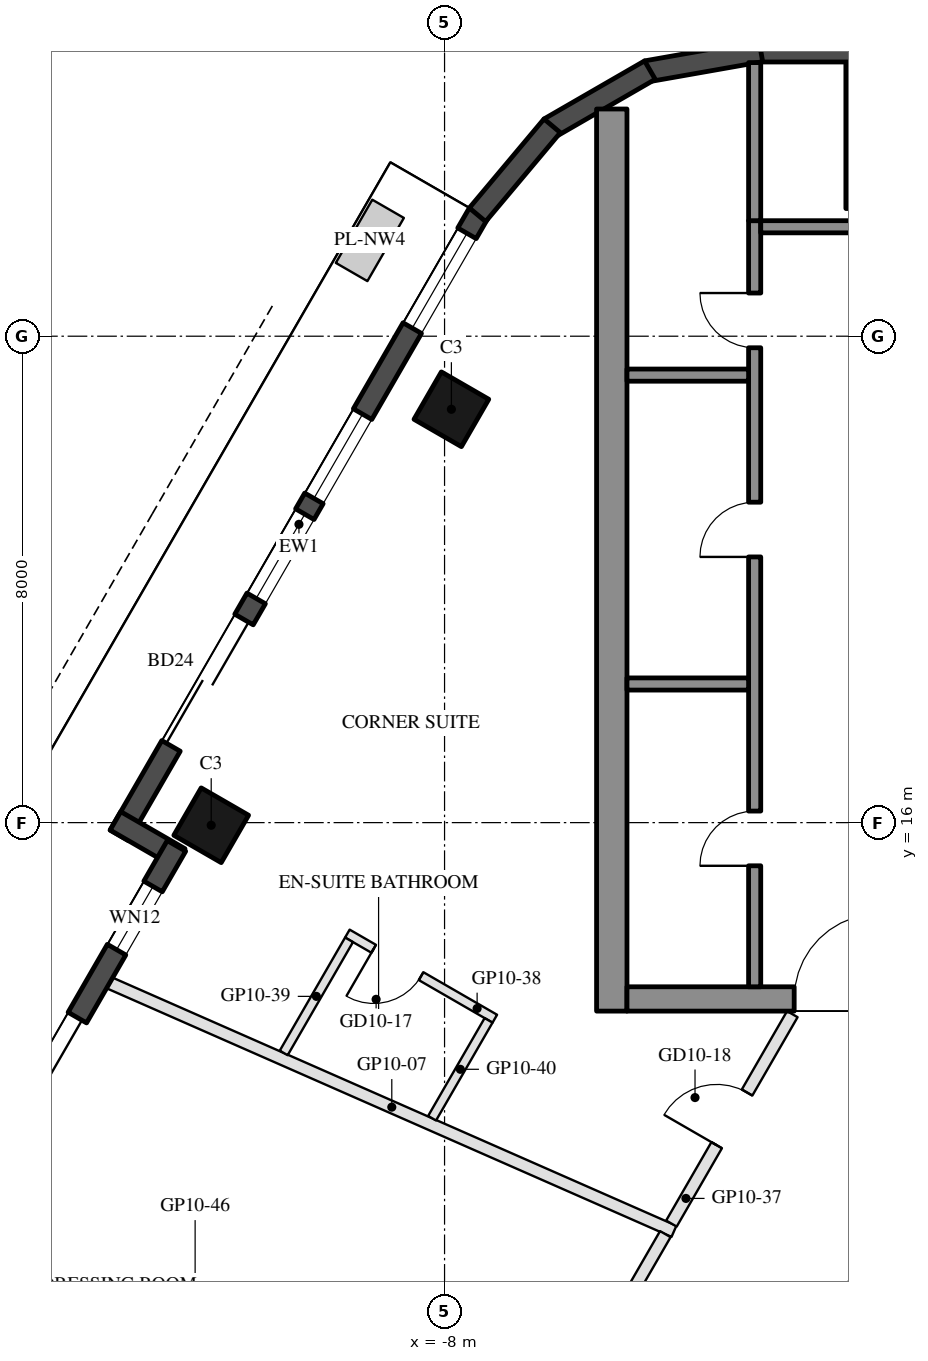
"""IFC4 building model, lengths in metres.
Left out: names, types, materials, properties, quantities, classifications, styles, units other than length and angle.
Written with IfcOpenShell. Run it as: python <this file> out.ifc"""

import sys

from ifc_helpers import new_model, si_unit, direction, frame, frame_2d, origin, origin_2d, place, context, subcontext, project, spatial, rectangle, hollow_rectangle, extrude, element, fill, save


model = new_model("IFC4")
c1 = context("Model", 3, precision=1e-05, world=origin(), true_north=direction((0.0, 1.0)))
c2 = subcontext(c1, "Body", "Model", "MODEL_VIEW")
j1 = project(units=[si_unit("LENGTHUNIT", "METRE"), si_unit("PLANEANGLEUNIT", "RADIAN")], contexts=[c1])
p1 = place(None, origin())
s1 = spatial("IfcSite", under=j1, at=p1, CompositionType="ELEMENT")
p2 = place(p1, origin())
s2 = spatial("IfcBuilding", under=s1, at=p2, CompositionType="ELEMENT")
p3 = place(p2, frame((0.0, 0.0, 120.5)))
s3 = spatial("IfcBuildingStorey", under=s2, at=p3, CompositionType="ELEMENT", Elevation=120.5)
for number, where, z_axis, x_axis in (
    (1, (-7.888, 22.798, 0.0), (0.0, 0.0, 1.0), (0.5, 0.866, 0.0)),
    (2, (-11.838, 15.957, 0.0), (0.0, 0.0, 1.0), (0.5, 0.866, 0.0)),
):
    element("IfcColumn", number, at=place(p3, frame(where, z_axis=z_axis, x_axis=x_axis)), inside=s3, PredefinedType="COLUMN", context=c2, shape_type="SweptSolid", body=[
        extrude(hollow_rectangle(XDim=0.9, YDim=0.9, WallThickness=0.04, at=origin_2d()), origin(), (0.0, 0.0, 1.0), 3.7),
    ])
p4 = place(p3, frame((0.0, 27.3, 0.0), z_axis=(0.0, 0.0, 1.0), x_axis=(1.0, 0.0, 0.0)))
e3 = element("IfcColumn", 3, at=p4, inside=s3, PredefinedType="COLUMN", context=c2, shape_type="SweptSolid", body=[
    extrude(hollow_rectangle(XDim=2.8, YDim=2.4, WallThickness=0.07, at=origin_2d()), origin(), (0.0, 0.0, 1.0), 3.7),
])
p5 = place(p3, frame((-7.441, 26.022, 0.0), z_axis=(0.0, 0.0, 1.0), x_axis=(-0.499992533062, -0.86602971478, 0.0)))
e4 = element("IfcWall", 4, at=p5, inside=s3, PredefinedType="SOLIDWALL", context=c2, shape_type="SweptSolid", body=[
    extrude(rectangle(XDim=11.816, YDim=0.35, at=frame_2d((5.908, 0.0))), origin(), (0.0, 0.0, 1.0), 3.55),
])
p6 = place(p5, frame((0.381, 0.0, 0.3)))
e5 = element("IfcOpeningElement", 5, at=p6, cuts=e4, PredefinedType="OPENING", context=c2, shape_type="SweptSolid", body=[
    extrude(rectangle(XDim=1.8, YDim=2.65, at=frame_2d((0.9, 1.325))), frame((0.0, 0.185, 0.0), z_axis=(0.0, -1.0, 0.0), x_axis=(1.0, 0.0, 0.0)), (0.0, 0.0, 1.0), 0.37),
])
p7 = place(p5, frame((7.716, 0.0, 0.0)))
e6 = element("IfcOpeningElement", 6, at=p7, cuts=e4, PredefinedType="OPENING", context=c2, shape_type="SweptSolid", body=[
    extrude(rectangle(XDim=2.4, YDim=2.4, at=frame_2d((1.2, 1.2))), frame((0.0, 0.185, 0.0), z_axis=(0.0, -1.0, 0.0), x_axis=(1.0, 0.0, 0.0)), (0.0, 0.0, 1.0), 0.37),
])
p8 = place(p5, frame((3.815, 0.0, 0.3)))
e7 = element("IfcOpeningElement", 7, at=p8, cuts=e4, PredefinedType="OPENING", context=c2, shape_type="SweptSolid", body=[
    extrude(rectangle(XDim=1.6, YDim=2.65, at=frame_2d((0.8, 1.325))), frame((0.0, 0.185, 0.0), z_axis=(0.0, -1.0, 0.0), x_axis=(1.0, 0.0, 0.0)), (0.0, 0.0, 1.0), 0.37),
])
p9 = place(p5, frame((5.715, 0.0, 0.3)))
e8 = element("IfcOpeningElement", 8, at=p9, cuts=e4, PredefinedType="OPENING", context=c2, shape_type="SweptSolid", body=[
    extrude(rectangle(XDim=1.6, YDim=2.65, at=frame_2d((0.8, 1.325))), frame((0.0, 0.185, 0.0), z_axis=(0.0, -1.0, 0.0), x_axis=(1.0, 0.0, 0.0)), (0.0, 0.0, 1.0), 0.37),
])
p10 = place(p3, frame((-13.413, 16.029, 0.0), z_axis=(0.0, 0.0, 1.0), x_axis=(0.866005645448, -0.500034220881, 0.0)))
e9 = element("IfcWall", 9, at=p10, inside=s3, PredefinedType="SOLIDWALL", context=c2, shape_type="SweptSolid", body=[
    extrude(rectangle(XDim=1.22, YDim=0.35, at=frame_2d((0.61, 0.0))), origin(), (0.0, 0.0, 1.0), 3.55),
])
p11 = place(p3, frame((-12.409, 15.617, 0.0), z_axis=(0.0, 0.0, 1.0), x_axis=(-0.500003597184, -0.866023326939, 0.0)))
e10 = element("IfcWall", 10, at=p11, inside=s3, PredefinedType="SOLIDWALL", context=c2, shape_type="SweptSolid", body=[
    extrude(rectangle(XDim=6.74, YDim=0.35, at=frame_2d((3.37, 0.0))), origin(), (0.0, 0.0, 1.0), 3.55),
])
p12 = place(p11, frame((0.77, 0.0, 0.3)))
e11 = element("IfcOpeningElement", 11, at=p12, cuts=e10, PredefinedType="OPENING", context=c2, shape_type="SweptSolid", body=[
    extrude(rectangle(XDim=1.2, YDim=2.65, at=frame_2d((0.6, 1.325))), frame((0.0, 0.185, 0.0), z_axis=(0.0, -1.0, 0.0), x_axis=(1.0, 0.0, 0.0)), (0.0, 0.0, 1.0), 0.37),
])
p13 = place(p11, frame((3.26, 0.0, 0.0)))
e12 = element("IfcOpeningElement", 12, at=p13, cuts=e10, PredefinedType="OPENING", context=c2, shape_type="SweptSolid", body=[
    extrude(rectangle(XDim=2.4, YDim=2.4, at=frame_2d((1.2, 1.2))), frame((0.0, 0.185, 0.0), z_axis=(0.0, -1.0, 0.0), x_axis=(1.0, 0.0, 0.0)), (0.0, 0.0, 1.0), 0.37),
])
p14 = place(p3, frame((2.829, 28.685, 0.0), z_axis=(0.0, 0.0, 1.0), x_axis=(-1.0, 0.0, 0.0)))
e13 = element("IfcWall", 13, at=p14, inside=s3, PredefinedType="SOLIDWALL", context=c2, shape_type="SweptSolid", body=[
    extrude(rectangle(XDim=5.658, YDim=0.35, at=frame_2d((2.829, 0.0))), origin(), (0.0, 0.0, 1.0), 3.55),
])
for number, where, z_axis, x_axis in (
    (14, (-2.799, 28.688, 0.0), (0.0, 0.0, 1.0), (-0.985, -0.174, 0.0)),
    (15, (-4.623, 28.377, 0.0), (0.0, 0.0, 1.0), (-0.866, -0.5, 0.0)),
):
    element("IfcWall", number, at=place(p3, frame(where, z_axis=z_axis, x_axis=x_axis)), inside=s3, PredefinedType="SOLIDWALL", context=c2, shape_type="SweptSolid", body=[
        extrude(rectangle(XDim=1.91, YDim=0.35, at=frame_2d((0.955, 0.0))), origin(), (0.0, 0.0, 1.0), 3.55),
    ])
p15 = place(p3, frame((-6.23, 27.461, 0.0), z_axis=(0.0, 0.0, 1.0), x_axis=(-0.642808304945, -0.766027077259, 0.0)))
e16 = element("IfcWall", 16, at=p15, inside=s3, PredefinedType="SOLIDWALL", context=c2, shape_type="SweptSolid", body=[
    extrude(rectangle(XDim=1.91, YDim=0.35, at=frame_2d((0.955, 0.0))), origin(), (0.0, 0.0, 1.0), 3.55),
])
p16 = place(p3, frame((-5.25, 12.9, 0.0), z_axis=(0.0, 0.0, 1.0), x_axis=(0.0, 1.0, 0.0)))
e17 = element("IfcWall", 17, at=p16, inside=s3, PredefinedType="SHEAR", context=c2, shape_type="SweptSolid", body=[
    extrude(rectangle(XDim=14.837, YDim=0.5, at=frame_2d((7.418, 0.0))), origin(), (0.0, 0.0, 1.0), 3.5),
])
p17 = place(p3, frame((5.0, 13.1, 0.0), z_axis=(0.0, 0.0, 1.0), x_axis=(-1.0, 0.0, 0.0)))
e18 = element("IfcWall", 18, at=p17, inside=s3, PredefinedType="SHEAR", context=c2, shape_type="SweptSolid", body=[
    extrude(rectangle(XDim=10.0, YDim=0.4, at=frame_2d((5.0, 0.0))), origin(), (0.0, 0.0, 1.0), 3.5),
])
p18 = place(p17, frame((3.55, 0.0, 0.0)))
e19 = element("IfcOpeningElement", 19, at=p18, cuts=e18, PredefinedType="OPENING", context=c2, shape_type="SweptSolid", body=[
    extrude(rectangle(XDim=1.1, YDim=2.1, at=frame_2d((0.55, 1.05))), frame((0.0, 0.21, 0.0), z_axis=(0.0, -1.0, 0.0), x_axis=(1.0, 0.0, 0.0)), (0.0, 0.0, 1.0), 0.42),
])
p19 = place(p17, frame((5.85, 0.0, 0.0)))
e20 = element("IfcOpeningElement", 20, at=p19, cuts=e18, PredefinedType="OPENING", context=c2, shape_type="SweptSolid", body=[
    extrude(rectangle(XDim=1.4, YDim=2.1, at=frame_2d((0.7, 1.05))), frame((0.0, 0.21, 0.0), z_axis=(0.0, -1.0, 0.0), x_axis=(1.0, 0.0, 0.0)), (0.0, 0.0, 1.0), 0.42),
])
p20 = place(p3, frame((-2.9, 13.3, 0.0), z_axis=(0.0, 0.0, 1.0), x_axis=(0.0, 1.0, 0.0)))
e21 = element("IfcWall", 21, at=p20, inside=s3, PredefinedType="SHEAR", context=c2, shape_type="SweptSolid", body=[
    extrude(rectangle(XDim=12.6, YDim=0.2, at=frame_2d((6.3, 0.0))), origin(), (0.0, 0.0, 1.0), 3.5),
])
p21 = place(p20, frame((1.99, 0.0, 0.0)))
e22 = element("IfcOpeningElement", 22, at=p21, cuts=e21, PredefinedType="OPENING", context=c2, shape_type="SweptSolid", body=[
    extrude(rectangle(XDim=0.9, YDim=2.1, at=frame_2d((0.45, 1.05))), frame((0.0, 0.11, 0.0), z_axis=(0.0, -1.0, 0.0), x_axis=(1.0, 0.0, 0.0)), (0.0, 0.0, 1.0), 0.22),
])
p22 = place(p20, frame((7.07, 0.0, 0.0)))
e23 = element("IfcOpeningElement", 23, at=p22, cuts=e21, PredefinedType="OPENING", context=c2, shape_type="SweptSolid", body=[
    extrude(rectangle(XDim=0.9, YDim=2.1, at=frame_2d((0.45, 1.05))), frame((0.0, 0.11, 0.0), z_axis=(0.0, -1.0, 0.0), x_axis=(1.0, 0.0, 0.0)), (0.0, 0.0, 1.0), 0.22),
])
p23 = place(p20, frame((10.51, 0.0, 0.0)))
e24 = element("IfcOpeningElement", 24, at=p23, cuts=e21, PredefinedType="OPENING", context=c2, shape_type="SweptSolid", body=[
    extrude(rectangle(XDim=0.9, YDim=2.1, at=frame_2d((0.45, 1.05))), frame((0.0, 0.11, 0.0), z_axis=(0.0, -1.0, 0.0), x_axis=(1.0, 0.0, 0.0)), (0.0, 0.0, 1.0), 0.22),
])
p24 = place(p3, frame((-0.4, 25.8, 0.0), z_axis=(0.0, 0.0, 1.0), x_axis=(-1.0, 0.0, 0.0)))
e25 = element("IfcWall", 25, at=p24, inside=s3, PredefinedType="SHEAR", context=c2, shape_type="SweptSolid", body=[
    extrude(rectangle(XDim=2.4, YDim=0.2, at=frame_2d((1.2, 0.0))), origin(), (0.0, 0.0, 1.0), 3.5),
])
for number, where, z_axis, x_axis in (
    (26, (-3.0, 18.28, 0.0), (0.0, 0.0, 1.0), (-1.0, 0.0, 0.0)),
    (27, (-3.0, 23.36, 0.0), (0.0, 0.0, 1.0), (-1.0, 0.0, 0.0)),
):
    element("IfcWall", number, at=place(p3, frame(where, z_axis=z_axis, x_axis=x_axis)), inside=s3, PredefinedType="SHEAR", context=c2, shape_type="SweptSolid", body=[
        extrude(rectangle(XDim=2.0, YDim=0.2, at=frame_2d((1.0, 0.0))), origin(), (0.0, 0.0, 1.0), 3.5),
    ])
p25 = place(p3, frame((-2.9, 25.9, 0.0), z_axis=(0.0, 0.0, 1.0), x_axis=(0.0, 1.0, 0.0)))
e28 = element("IfcWall", 28, at=p25, inside=s3, PredefinedType="SHEAR", context=c2, shape_type="SweptSolid", body=[
    extrude(rectangle(XDim=2.6, YDim=0.2, at=frame_2d((1.3, 0.0))), origin(), (0.0, 0.0, 1.0), 3.5),
])
p26 = place(p3, frame((-13.508, 13.363, 0.0), z_axis=(0.0, 0.0, 1.0), x_axis=(0.915297635711, -0.402778149932, 0.0)))
e29 = element("IfcWall", 29, at=p26, inside=s3, PredefinedType="PARTITIONING", context=c2, shape_type="SweptSolid", body=[
    extrude(rectangle(XDim=10.14, YDim=0.2, at=frame_2d((5.07, 0.0))), origin(), (0.0, 0.0, 1.0), 2.96),
])
p27 = place(p3, frame((-4.269, 9.406, 0.0), z_axis=(0.0, 0.0, 1.0), x_axis=(0.499968678846, 0.866043486306, 0.0)))
e30 = element("IfcWall", 30, at=p27, inside=s3, PredefinedType="PARTITIONING", context=c2, shape_type="SweptSolid", body=[
    extrude(rectangle(XDim=3.977, YDim=0.2, at=frame_2d((1.988, 0.0))), origin(), (0.0, 0.0, 1.0), 2.95),
])
p28 = place(p27, frame((1.488, 0.0, 0.0)))
e31 = element("IfcOpeningElement", 31, at=p28, cuts=e30, PredefinedType="OPENING", context=c2, shape_type="SweptSolid", body=[
    extrude(rectangle(XDim=1.0, YDim=2.1, at=frame_2d((0.5, 1.05))), frame((0.0, 0.11, 0.0), z_axis=(0.0, -1.0, 0.0), x_axis=(1.0, 0.0, 0.0)), (0.0, 0.0, 1.0), 0.22),
])
p29 = place(p3, frame((-7.174, 12.775, 0.0), z_axis=(0.0, 0.0, 1.0), x_axis=(-0.866034573852, 0.49998411664, 0.0)))
e32 = element("IfcWall", 32, at=p29, inside=s3, PredefinedType="PARTITIONING", context=c2, shape_type="SweptSolid", body=[
    extrude(rectangle(XDim=2.8, YDim=0.15, at=frame_2d((1.4, 0.0))), origin(), (0.0, 0.0, 1.0), 3.55),
])
p30 = place(p29, frame((1.4, 0.0, 0.0)))
e33 = element("IfcOpeningElement", 33, at=p30, cuts=e32, PredefinedType="OPENING", context=c2, shape_type="SweptSolid", body=[
    extrude(rectangle(XDim=0.9, YDim=2.1, at=frame_2d((0.45, 1.05))), frame((0.0, 0.085, 0.0), z_axis=(0.0, -1.0, 0.0), x_axis=(1.0, 0.0, 0.0)), (0.0, 0.0, 1.0), 0.17),
])
p31 = place(p3, frame((-9.571, 14.073, 0.0), z_axis=(0.0, 0.0, 1.0), x_axis=(-0.50005036918, -0.865996321171, 0.0)))
e34 = element("IfcWall", 34, at=p31, inside=s3, PredefinedType="PARTITIONING", context=c2, shape_type="SweptSolid", body=[
    extrude(rectangle(XDim=2.148, YDim=0.15, at=frame_2d((1.074, 0.0))), origin(), (0.0, 0.0, 1.0), 3.55),
])
p32 = place(p3, frame((-7.276, 12.748, 0.0), z_axis=(0.0, 0.0, 1.0), x_axis=(-0.500067438192, -0.865986464825, 0.0)))
e35 = element("IfcWall", 35, at=p32, inside=s3, PredefinedType="PARTITIONING", context=c2, shape_type="SweptSolid", body=[
    extrude(rectangle(XDim=1.858, YDim=0.15, at=frame_2d((0.929, 0.0))), origin(), (0.0, 0.0, 1.0), 3.55),
])
p33 = place(p3, frame((-8.475, 2.122, 0.0), z_axis=(0.0, 0.0, 1.0), x_axis=(0.500005592383, 0.866022174996, 0.0)))
e36 = element("IfcWall", 36, at=p33, inside=s3, PredefinedType="PARTITIONING", context=c2, shape_type="SweptSolid", body=[
    extrude(rectangle(XDim=8.21, YDim=0.2, at=frame_2d((4.105, 0.0))), origin(), (0.0, 0.0, 1.0), 2.95),
])
p34 = place(p33, frame((2.45, 0.0, 0.0)))
e37 = element("IfcOpeningElement", 37, at=p34, cuts=e36, PredefinedType="OPENING", context=c2, shape_type="SweptSolid", body=[
    extrude(rectangle(XDim=1.0, YDim=2.1, at=frame_2d((0.5, 1.05))), frame((0.0, 0.11, 0.0), z_axis=(0.0, -1.0, 0.0), x_axis=(1.0, 0.0, 0.0)), (0.0, 0.0, 1.0), 0.22),
])
p35 = place(p6, origin())
e38 = element("IfcWindow", 38, at=p35, inside=s3, PartitioningType="SINGLE_PANEL", PredefinedType="WINDOW", context=c2, shape_type="SweptSolid", body=[
    extrude(rectangle(XDim=1.8, YDim=2.65, at=frame_2d((0.9, 1.325))), frame((0.0, 0.03, 0.0), z_axis=(0.0, -1.0, 0.0), x_axis=(1.0, 0.0, 0.0)), (0.0, 0.0, 1.0), 0.06),
])
fill(e5, e38)
p36 = place(p7, frame((2.4, 0.0, 0.0), z_axis=(0.0, 0.0, 1.0), x_axis=(-1.0, 0.0, 0.0)))
e39 = element("IfcDoor", 39, at=p36, inside=s3, OperationType="SLIDING_TO_LEFT", PredefinedType="DOOR", context=c2, shape_type="SweptSolid", body=[
    extrude(rectangle(XDim=2.4, YDim=2.4, at=frame_2d((1.2, 1.2))), frame((0.0, 0.025, 0.0), z_axis=(0.0, -1.0, 0.0), x_axis=(1.0, 0.0, 0.0)), (0.0, 0.0, 1.0), 0.05),
])
fill(e6, e39)
p37 = place(p8, origin())
e40 = element("IfcWindow", 40, at=p37, inside=s3, PartitioningType="SINGLE_PANEL", PredefinedType="WINDOW", context=c2, shape_type="SweptSolid", body=[
    extrude(rectangle(XDim=1.6, YDim=2.65, at=frame_2d((0.8, 1.325))), frame((0.0, 0.03, 0.0), z_axis=(0.0, -1.0, 0.0), x_axis=(1.0, 0.0, 0.0)), (0.0, 0.0, 1.0), 0.06),
])
fill(e7, e40)
p38 = place(p9, origin())
e41 = element("IfcWindow", 41, at=p38, inside=s3, PartitioningType="SINGLE_PANEL", PredefinedType="WINDOW", context=c2, shape_type="SweptSolid", body=[
    extrude(rectangle(XDim=1.6, YDim=2.65, at=frame_2d((0.8, 1.325))), frame((0.0, 0.03, 0.0), z_axis=(0.0, -1.0, 0.0), x_axis=(1.0, 0.0, 0.0)), (0.0, 0.0, 1.0), 0.06),
])
fill(e8, e41)
p39 = place(p12, origin())
e42 = element("IfcWindow", 42, at=p39, inside=s3, PartitioningType="SINGLE_PANEL", PredefinedType="WINDOW", context=c2, shape_type="SweptSolid", body=[
    extrude(rectangle(XDim=1.2, YDim=2.65, at=frame_2d((0.6, 1.325))), frame((0.0, 0.03, 0.0), z_axis=(0.0, -1.0, 0.0), x_axis=(1.0, 0.0, 0.0)), (0.0, 0.0, 1.0), 0.06),
])
fill(e11, e42)
p40 = place(p13, frame((2.4, 0.0, 0.0), z_axis=(0.0, 0.0, 1.0), x_axis=(-1.0, 0.0, 0.0)))
e43 = element("IfcDoor", 43, at=p40, inside=s3, OperationType="SLIDING_TO_LEFT", PredefinedType="DOOR", context=c2, shape_type="SweptSolid", body=[
    extrude(rectangle(XDim=2.4, YDim=2.4, at=frame_2d((1.2, 1.2))), frame((0.0, 0.025, 0.0), z_axis=(0.0, -1.0, 0.0), x_axis=(1.0, 0.0, 0.0)), (0.0, 0.0, 1.0), 0.05),
])
fill(e12, e43)
p41 = place(p21, origin())
e44 = element("IfcDoor", 44, at=p41, inside=s3, OperationType="SINGLE_SWING_LEFT", PredefinedType="DOOR", context=c2, shape_type="SweptSolid", body=[
    extrude(rectangle(XDim=0.9, YDim=2.1, at=frame_2d((0.45, 1.05))), frame((0.0, 0.025, 0.0), z_axis=(0.0, -1.0, 0.0), x_axis=(1.0, 0.0, 0.0)), (0.0, 0.0, 1.0), 0.05),
])
fill(e22, e44)
p42 = place(p22, origin())
e45 = element("IfcDoor", 45, at=p42, inside=s3, OperationType="SINGLE_SWING_LEFT", PredefinedType="DOOR", context=c2, shape_type="SweptSolid", body=[
    extrude(rectangle(XDim=0.9, YDim=2.1, at=frame_2d((0.45, 1.05))), frame((0.0, 0.025, 0.0), z_axis=(0.0, -1.0, 0.0), x_axis=(1.0, 0.0, 0.0)), (0.0, 0.0, 1.0), 0.05),
])
fill(e23, e45)
p43 = place(p23, origin())
e46 = element("IfcDoor", 46, at=p43, inside=s3, OperationType="SINGLE_SWING_RIGHT", PredefinedType="DOOR", context=c2, shape_type="SweptSolid", body=[
    extrude(rectangle(XDim=0.9, YDim=2.1, at=frame_2d((0.45, 1.05))), frame((0.0, 0.025, 0.0), z_axis=(0.0, -1.0, 0.0), x_axis=(1.0, 0.0, 0.0)), (0.0, 0.0, 1.0), 0.05),
])
fill(e24, e46)
p44 = place(p19, frame((1.4, 0.0, 0.0), z_axis=(0.0, 0.0, 1.0), x_axis=(-1.0, 0.0, 0.0)))
e47 = element("IfcDoor", 47, at=p44, inside=s3, OperationType="DOUBLE_DOOR_SINGLE_SWING", PredefinedType="DOOR", context=c2, shape_type="SweptSolid", body=[
    extrude(rectangle(XDim=1.4, YDim=2.1, at=frame_2d((0.7, 1.05))), frame((0.0, 0.025, 0.0), z_axis=(0.0, -1.0, 0.0), x_axis=(1.0, 0.0, 0.0)), (0.0, 0.0, 1.0), 0.05),
])
fill(e20, e47)
p45 = place(p30, origin())
e48 = element("IfcDoor", 48, at=p45, inside=s3, OperationType="SINGLE_SWING_RIGHT", PredefinedType="DOOR", context=c2, shape_type="SweptSolid", body=[
    extrude(rectangle(XDim=0.9, YDim=2.1, at=frame_2d((0.45, 1.05))), frame((0.0, 0.025, 0.0), z_axis=(0.0, -1.0, 0.0), x_axis=(1.0, 0.0, 0.0)), (0.0, 0.0, 1.0), 0.05),
])
fill(e33, e48)
p46 = place(p28, origin())
e49 = element("IfcDoor", 49, at=p46, inside=s3, OperationType="SINGLE_SWING_LEFT", PredefinedType="DOOR", context=c2, shape_type="SweptSolid", body=[
    extrude(rectangle(XDim=1.0, YDim=2.1, at=frame_2d((0.5, 1.05))), frame((0.0, 0.025, 0.0), z_axis=(0.0, -1.0, 0.0), x_axis=(1.0, 0.0, 0.0)), (0.0, 0.0, 1.0), 0.05),
])
fill(e31, e49)
save(model, sys.argv[1])
